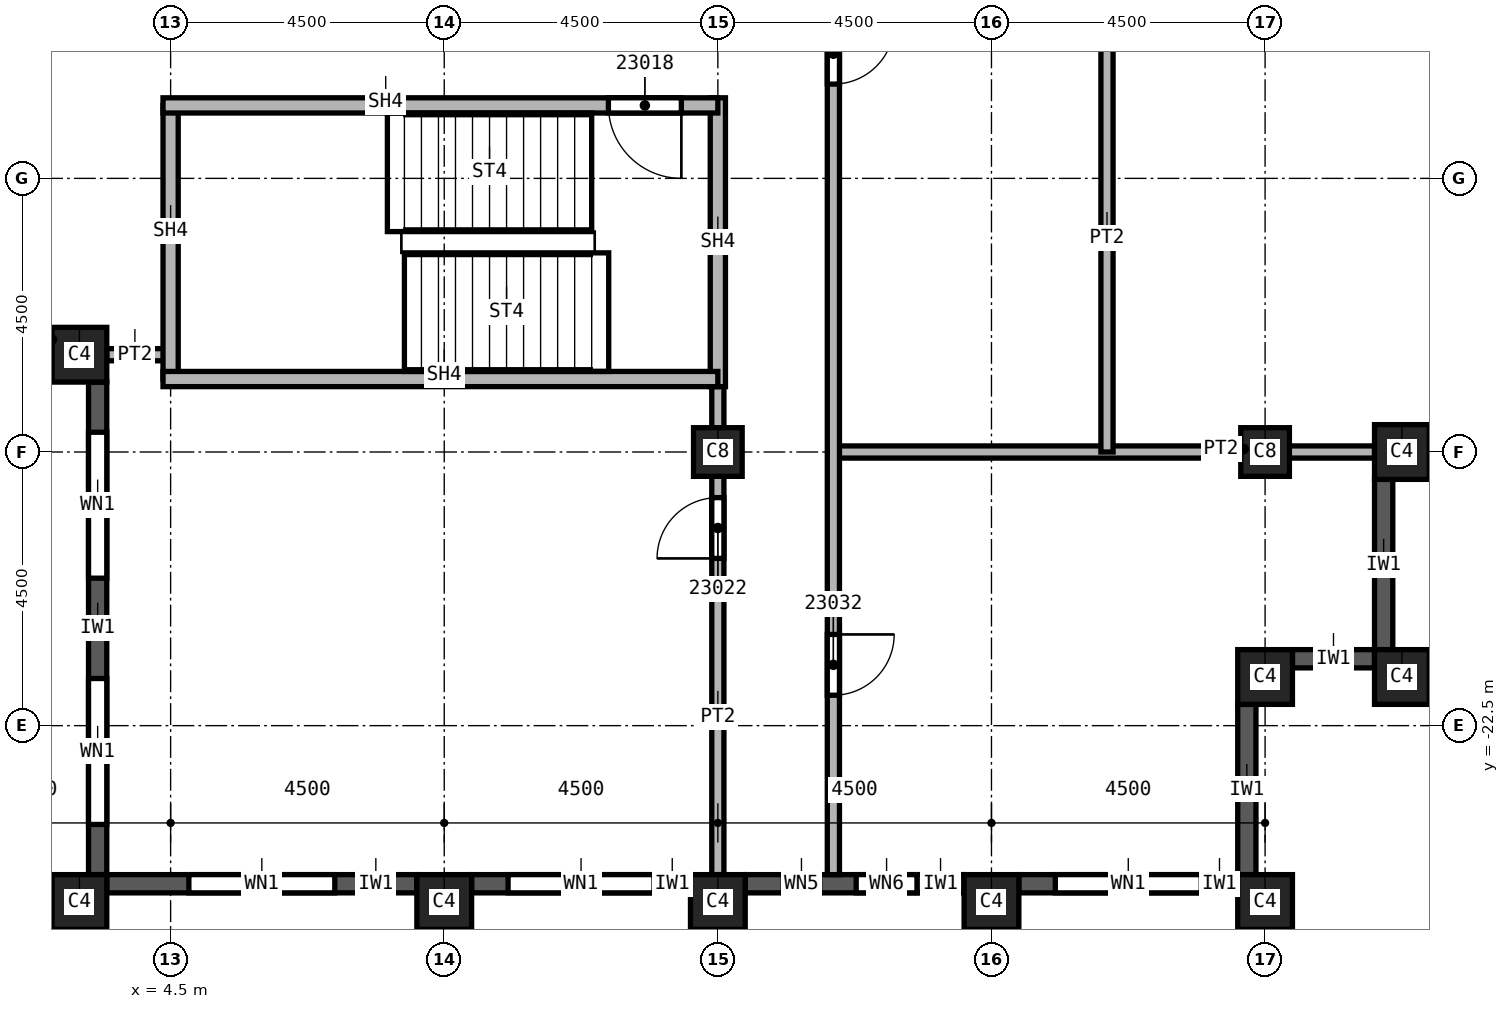
"""IFC4 building model, lengths in metres.
Left out: names, types, materials, properties, quantities, classifications, styles, units other than length and angle.
Written with IfcOpenShell. Run it as: python <this file> out.ifc"""

import sys

from ifc_helpers import new_model, si_unit, direction, frame, frame_2d, origin, origin_2d, place, context, subcontext, project, spatial, rectangle, extrude, element, fill, save


model = new_model("IFC4")
c1 = context("Model", 3, precision=1e-05, world=origin(), true_north=direction((0.0, 1.0)))
c2 = subcontext(c1, "Body", "Model", "MODEL_VIEW")
j1 = project(units=[si_unit("LENGTHUNIT", "METRE"), si_unit("PLANEANGLEUNIT", "RADIAN")], contexts=[c1])
p1 = place(None, origin())
s1 = spatial("IfcSite", under=j1, at=p1, CompositionType="ELEMENT")
p2 = place(p1, origin())
s2 = spatial("IfcBuilding", under=s1, at=p2, CompositionType="ELEMENT")
p3 = place(p2, frame((0.0, 0.0, 330.0)))
s3 = spatial("IfcBuildingStorey", under=s2, at=p3, CompositionType="ELEMENT", Elevation=330.0)
for number, where, z_axis, x_axis in (
    (1, (13.5, -18.0, 0.0), (0.0, 0.0, 1.0), (1.0, 0.0, 0.0)),
    (2, (22.5, -18.0, 0.0), (0.0, 0.0, 1.0), (1.0, 0.0, 0.0)),
):
    element("IfcColumn", number, at=place(p3, frame(where, z_axis=z_axis, x_axis=x_axis)), inside=s3, PredefinedType="COLUMN", context=c2, shape_type="SweptSolid", body=[
        extrude(rectangle(XDim=0.8, YDim=0.8, at=origin_2d()), origin(), (0.0, 0.0, 1.0), 3.74),
    ])
for number, where, z_axis, x_axis in (
    (3, (3.0, -25.4, 0.0), (0.0, 0.0, 1.0), (1.0, 0.0, 0.0)),
    (4, (9.0, -25.4, 0.0), (0.0, 0.0, 1.0), (1.0, 0.0, 0.0)),
    (5, (13.5, -25.4, 0.0), (0.0, 0.0, 1.0), (1.0, 0.0, 0.0)),
    (6, (18.0, -25.4, 0.0), (0.0, 0.0, 1.0), (1.0, 0.0, 0.0)),
    (7, (22.5, -25.4, 0.0), (0.0, 0.0, 1.0), (1.0, 0.0, 0.0)),
    (8, (3.0, -16.4, 0.0), (0.0, 0.0, 1.0), (1.0, 0.0, 0.0)),
    (9, (22.5, -21.7, 0.0), (0.0, 0.0, 1.0), (1.0, 0.0, 0.0)),
    (10, (24.75, -21.7, 0.0), (0.0, 0.0, 1.0), (1.0, 0.0, 0.0)),
    (11, (24.75, -18.0, 0.0), (0.0, 0.0, 1.0), (1.0, 0.0, 0.0)),
):
    element("IfcColumn", number, at=place(p3, frame(where, z_axis=z_axis, x_axis=x_axis)), inside=s3, PredefinedType="COLUMN", context=c2, shape_type="SweptSolid", body=[
        extrude(rectangle(XDim=0.9, YDim=0.9, at=origin_2d()), origin(), (0.0, 0.0, 1.0), 3.74),
    ])
p4 = place(p3, frame((3.3, -16.85, 0.0), z_axis=(0.0, 0.0, 1.0), x_axis=(0.0, -1.0, 0.0)))
e12 = element("IfcWall", 12, at=p4, inside=s3, PredefinedType="SOLIDWALL", context=c2, shape_type="SweptSolid", body=[
    extrude(rectangle(XDim=8.1, YDim=0.3, at=frame_2d((4.05, 0.0))), origin(), (0.0, 0.0, 1.0), 3.14),
])
p5 = place(p4, frame((0.825, 0.0, 0.8)))
e13 = element("IfcOpeningElement", 13, at=p5, cuts=e12, PredefinedType="OPENING", context=c2, shape_type="SweptSolid", body=[
    extrude(rectangle(XDim=2.4, YDim=1.95, at=frame_2d((1.2, 0.975))), frame((0.0, 0.15, 0.0), z_axis=(0.0, -1.0, 0.0), x_axis=(1.0, 0.0, 0.0)), (0.0, 0.0, 1.0), 0.3),
])
p6 = place(p4, frame((4.875, 0.0, 0.8)))
e14 = element("IfcOpeningElement", 14, at=p6, cuts=e12, PredefinedType="OPENING", context=c2, shape_type="SweptSolid", body=[
    extrude(rectangle(XDim=2.4, YDim=1.95, at=frame_2d((1.2, 0.975))), frame((0.0, 0.15, 0.0), z_axis=(0.0, -1.0, 0.0), x_axis=(1.0, 0.0, 0.0)), (0.0, 0.0, 1.0), 0.3),
])
p7 = place(p3, frame((3.45, -25.1, 0.0), z_axis=(0.0, 0.0, 1.0), x_axis=(1.0, 0.0, 0.0)))
e15 = element("IfcWall", 15, at=p7, inside=s3, PredefinedType="SOLIDWALL", context=c2, shape_type="SweptSolid", body=[
    extrude(rectangle(XDim=5.1, YDim=0.3, at=frame_2d((2.55, 0.0))), origin(), (0.0, 0.0, 1.0), 3.14),
])
p8 = place(p7, frame((1.35, 0.0, 0.8)))
e16 = element("IfcOpeningElement", 16, at=p8, cuts=e15, PredefinedType="OPENING", context=c2, shape_type="SweptSolid", body=[
    extrude(rectangle(XDim=2.4, YDim=1.95, at=frame_2d((1.2, 0.975))), frame((0.0, 0.15, 0.0), z_axis=(0.0, -1.0, 0.0), x_axis=(1.0, 0.0, 0.0)), (0.0, 0.0, 1.0), 0.3),
])
p9 = place(p3, frame((9.45, -25.1, 0.0), z_axis=(0.0, 0.0, 1.0), x_axis=(1.0, 0.0, 0.0)))
e17 = element("IfcWall", 17, at=p9, inside=s3, PredefinedType="SOLIDWALL", context=c2, shape_type="SweptSolid", body=[
    extrude(rectangle(XDim=3.6, YDim=0.3, at=frame_2d((1.8, 0.0))), origin(), (0.0, 0.0, 1.0), 3.14),
])
p10 = place(p9, frame((0.6, 0.0, 0.8)))
e18 = element("IfcOpeningElement", 18, at=p10, cuts=e17, PredefinedType="OPENING", context=c2, shape_type="SweptSolid", body=[
    extrude(rectangle(XDim=2.4, YDim=1.95, at=frame_2d((1.2, 0.975))), frame((0.0, 0.15, 0.0), z_axis=(0.0, -1.0, 0.0), x_axis=(1.0, 0.0, 0.0)), (0.0, 0.0, 1.0), 0.3),
])
p11 = place(p3, frame((13.95, -25.1, 0.0), z_axis=(0.0, 0.0, 1.0), x_axis=(1.0, 0.0, 0.0)))
e19 = element("IfcWall", 19, at=p11, inside=s3, PredefinedType="SOLIDWALL", context=c2, shape_type="SweptSolid", body=[
    extrude(rectangle(XDim=3.6, YDim=0.3, at=frame_2d((1.8, 0.0))), origin(), (0.0, 0.0, 1.0), 3.14),
])
p12 = place(p11, frame((0.625, 0.0, 0.8)))
e20 = element("IfcOpeningElement", 20, at=p12, cuts=e19, PredefinedType="OPENING", context=c2, shape_type="SweptSolid", body=[
    extrude(rectangle(XDim=0.6, YDim=1.95, at=frame_2d((0.3, 0.975))), frame((0.0, 0.15, 0.0), z_axis=(0.0, -1.0, 0.0), x_axis=(1.0, 0.0, 0.0)), (0.0, 0.0, 1.0), 0.3),
])
p13 = place(p11, frame((1.825, 0.0, 0.8)))
e21 = element("IfcOpeningElement", 21, at=p13, cuts=e19, PredefinedType="OPENING", context=c2, shape_type="SweptSolid", body=[
    extrude(rectangle(XDim=1.0, YDim=1.95, at=frame_2d((0.5, 0.975))), frame((0.0, 0.15, 0.0), z_axis=(0.0, -1.0, 0.0), x_axis=(1.0, 0.0, 0.0)), (0.0, 0.0, 1.0), 0.3),
])
p14 = place(p3, frame((18.45, -25.1, 0.0), z_axis=(0.0, 0.0, 1.0), x_axis=(1.0, 0.0, 0.0)))
e22 = element("IfcWall", 22, at=p14, inside=s3, PredefinedType="SOLIDWALL", context=c2, shape_type="SweptSolid", body=[
    extrude(rectangle(XDim=3.6, YDim=0.3, at=frame_2d((1.8, 0.0))), origin(), (0.0, 0.0, 1.0), 3.14),
])
p15 = place(p14, frame((0.6, 0.0, 0.8)))
e23 = element("IfcOpeningElement", 23, at=p15, cuts=e22, PredefinedType="OPENING", context=c2, shape_type="SweptSolid", body=[
    extrude(rectangle(XDim=2.4, YDim=1.95, at=frame_2d((1.2, 0.975))), frame((0.0, 0.15, 0.0), z_axis=(0.0, -1.0, 0.0), x_axis=(1.0, 0.0, 0.0)), (0.0, 0.0, 1.0), 0.3),
])
p16 = place(p3, frame((22.2, -24.95, 0.0), z_axis=(0.0, 0.0, 1.0), x_axis=(0.0, 1.0, 0.0)))
e24 = element("IfcWall", 24, at=p16, inside=s3, PredefinedType="SOLIDWALL", context=c2, shape_type="SweptSolid", body=[
    extrude(rectangle(XDim=2.8, YDim=0.3, at=frame_2d((1.4, 0.0))), origin(), (0.0, 0.0, 1.0), 3.14),
])
p17 = place(p3, frame((22.95, -21.4, 0.0), z_axis=(0.0, 0.0, 1.0), x_axis=(1.0, 0.0, 0.0)))
e25 = element("IfcWall", 25, at=p17, inside=s3, PredefinedType="SOLIDWALL", context=c2, shape_type="SweptSolid", body=[
    extrude(rectangle(XDim=1.35, YDim=0.3, at=frame_2d((0.675, 0.0))), origin(), (0.0, 0.0, 1.0), 3.14),
])
p18 = place(p3, frame((24.45, -21.25, 0.0), z_axis=(0.0, 0.0, 1.0), x_axis=(0.0, 1.0, 0.0)))
e26 = element("IfcWall", 26, at=p18, inside=s3, PredefinedType="SOLIDWALL", context=c2, shape_type="SweptSolid", body=[
    extrude(rectangle(XDim=2.8, YDim=0.3, at=frame_2d((1.4, 0.0))), origin(), (0.0, 0.0, 1.0), 3.14),
])
p19 = place(p3, frame((4.5, -16.4, 0.0), z_axis=(0.0, 0.0, 1.0), x_axis=(-1.0, 0.0, 0.0)))
e27 = element("IfcWall", 27, at=p19, inside=s3, PredefinedType="PARTITIONING", context=c2, shape_type="SweptSolid", body=[
    extrude(rectangle(XDim=1.05, YDim=0.2, at=frame_2d((0.525, 0.0))), origin(), (0.0, 0.0, 1.0), 3.74),
])
p20 = place(p3, frame((13.5, -24.95, 0.0), z_axis=(0.0, 0.0, 1.0), x_axis=(0.0, 1.0, 0.0)))
e28 = element("IfcWall", 28, at=p20, inside=s3, PredefinedType="PARTITIONING", context=c2, shape_type="SweptSolid", body=[
    extrude(rectangle(XDim=8.275, YDim=0.2, at=frame_2d((4.137, 0.0))), origin(), (0.0, 0.0, 1.0), 3.74),
])
p21 = place(p20, frame((5.2, 0.0, 0.0)))
e29 = element("IfcOpeningElement", 29, at=p21, cuts=e28, PredefinedType="OPENING", context=c2, shape_type="SweptSolid", body=[
    extrude(rectangle(XDim=1.0, YDim=2.1, at=frame_2d((0.5, 1.05))), frame((0.0, 0.1, 0.0), z_axis=(0.0, -1.0, 0.0), x_axis=(1.0, 0.0, 0.0)), (0.0, 0.0, 1.0), 0.2),
])
p22 = place(p3, frame((15.4, -18.0, 0.0), z_axis=(0.0, 0.0, 1.0), x_axis=(1.0, 0.0, 0.0)))
e30 = element("IfcWall", 30, at=p22, inside=s3, PredefinedType="PARTITIONING", context=c2, shape_type="SweptSolid", body=[
    extrude(rectangle(XDim=8.9, YDim=0.2, at=frame_2d((4.45, 0.0))), origin(), (0.0, 0.0, 1.0), 3.74),
])
p23 = place(p3, frame((15.4, 24.95, 0.0), z_axis=(0.0, 0.0, 1.0), x_axis=(0.0, -1.0, 0.0)))
e31 = element("IfcWall", 31, at=p23, inside=s3, PredefinedType="PARTITIONING", context=c2, shape_type="SweptSolid", body=[
    extrude(rectangle(XDim=49.9, YDim=0.2, at=frame_2d((24.95, 0.0))), origin(), (0.0, 0.0, 1.0), 3.74),
])
p24 = place(p23, frame((20.45, 0.0, 0.0)))
e32 = element("IfcOpeningElement", 32, at=p24, cuts=e31, PredefinedType="OPENING", context=c2, shape_type="SweptSolid", body=[
    extrude(rectangle(XDim=1.0, YDim=2.1, at=frame_2d((0.5, 1.05))), frame((0.0, 0.1, 0.0), z_axis=(0.0, -1.0, 0.0), x_axis=(1.0, 0.0, 0.0)), (0.0, 0.0, 1.0), 0.2),
])
p25 = place(p23, frame((5.05, 0.0, 0.0)))
e33 = element("IfcOpeningElement", 33, at=p25, cuts=e31, PredefinedType="OPENING", context=c2, shape_type="SweptSolid", body=[
    extrude(rectangle(XDim=1.0, YDim=2.1, at=frame_2d((0.5, 1.05))), frame((0.0, 0.1, 0.0), z_axis=(0.0, -1.0, 0.0), x_axis=(1.0, 0.0, 0.0)), (0.0, 0.0, 1.0), 0.2),
])
p26 = place(p23, frame((45.95, 0.0, 0.0)))
e34 = element("IfcOpeningElement", 34, at=p26, cuts=e31, PredefinedType="OPENING", context=c2, shape_type="SweptSolid", body=[
    extrude(rectangle(XDim=1.0, YDim=2.1, at=frame_2d((0.5, 1.05))), frame((0.0, 0.1, 0.0), z_axis=(0.0, -1.0, 0.0), x_axis=(1.0, 0.0, 0.0)), (0.0, 0.0, 1.0), 0.2),
])
p27 = place(p23, frame((35.9, 0.0, 0.0)))
e35 = element("IfcOpeningElement", 35, at=p27, cuts=e31, PredefinedType="OPENING", context=c2, shape_type="SweptSolid", body=[
    extrude(rectangle(XDim=1.0, YDim=2.1, at=frame_2d((0.5, 1.05))), frame((0.0, 0.1, 0.0), z_axis=(0.0, -1.0, 0.0), x_axis=(1.0, 0.0, 0.0)), (0.0, 0.0, 1.0), 0.2),
])
p28 = place(p23, frame((25.1, 0.0, 0.0)))
e36 = element("IfcOpeningElement", 36, at=p28, cuts=e31, PredefinedType="OPENING", context=c2, shape_type="SweptSolid", body=[
    extrude(rectangle(XDim=1.0, YDim=2.1, at=frame_2d((0.5, 1.05))), frame((0.0, 0.1, 0.0), z_axis=(0.0, -1.0, 0.0), x_axis=(1.0, 0.0, 0.0)), (0.0, 0.0, 1.0), 0.2),
])
p29 = place(p3, frame((19.9, -6.65, 0.0), z_axis=(0.0, 0.0, 1.0), x_axis=(0.0, -1.0, 0.0)))
e37 = element("IfcWall", 37, at=p29, inside=s3, PredefinedType="PARTITIONING", context=c2, shape_type="SweptSolid", body=[
    extrude(rectangle(XDim=11.35, YDim=0.2, at=frame_2d((5.675, 0.0))), origin(), (0.0, 0.0, 1.0), 3.74),
])
p30 = place(p29, frame((3.4, 0.0, 0.0)))
e38 = element("IfcOpeningElement", 38, at=p30, cuts=e37, PredefinedType="OPENING", context=c2, shape_type="SweptSolid", body=[
    extrude(rectangle(XDim=1.0, YDim=2.1, at=frame_2d((0.5, 1.05))), frame((0.0, 0.1, 0.0), z_axis=(0.0, -1.0, 0.0), x_axis=(1.0, 0.0, 0.0)), (0.0, 0.0, 1.0), 0.2),
])
p31 = place(p3, frame((4.5, -16.8, 0.0), z_axis=(0.0, 0.0, 1.0), x_axis=(0.0, 1.0, 0.0)))
e39 = element("IfcWall", 39, at=p31, inside=s3, PredefinedType="SOLIDWALL", context=c2, shape_type="SweptSolid", body=[
    extrude(rectangle(XDim=4.5, YDim=0.25, at=frame_2d((2.25, 0.0))), origin(), (0.0, 0.0, 1.0), 3.74),
])
p32 = place(p3, frame((13.5, -16.925, 0.0), z_axis=(0.0, 0.0, 1.0), x_axis=(0.0, 1.0, 0.0)))
e40 = element("IfcWall", 40, at=p32, inside=s3, PredefinedType="SOLIDWALL", context=c2, shape_type="SweptSolid", body=[
    extrude(rectangle(XDim=4.75, YDim=0.25, at=frame_2d((2.375, 0.0))), origin(), (0.0, 0.0, 1.0), 3.74),
])
p33 = place(p3, frame((13.5, -16.8, 0.0), z_axis=(0.0, 0.0, 1.0), x_axis=(-1.0, 0.0, 0.0)))
e41 = element("IfcWall", 41, at=p33, inside=s3, PredefinedType="SOLIDWALL", context=c2, shape_type="SweptSolid", body=[
    extrude(rectangle(XDim=9.125, YDim=0.25, at=frame_2d((4.562, 0.0))), origin(), (0.0, 0.0, 1.0), 3.74),
])
p34 = place(p3, frame((13.5, -12.3, 0.0), z_axis=(0.0, 0.0, 1.0), x_axis=(-1.0, 0.0, 0.0)))
e42 = element("IfcWall", 42, at=p34, inside=s3, PredefinedType="SOLIDWALL", context=c2, shape_type="SweptSolid", body=[
    extrude(rectangle(XDim=9.125, YDim=0.25, at=frame_2d((4.562, 0.0))), origin(), (0.0, 0.0, 1.0), 3.74),
])
p35 = place(p34, frame((0.6, 0.0, 0.0)))
e43 = element("IfcOpeningElement", 43, at=p35, cuts=e42, PredefinedType="OPENING", context=c2, shape_type="SweptSolid", body=[
    extrude(rectangle(XDim=1.2, YDim=2.1, at=frame_2d((0.6, 1.05))), frame((0.0, 0.125, 0.0), z_axis=(0.0, -1.0, 0.0), x_axis=(1.0, 0.0, 0.0)), (0.0, 0.0, 1.0), 0.25),
])
p36 = place(p5, origin())
e44 = element("IfcWindow", 44, at=p36, inside=s3, PartitioningType="SINGLE_PANEL", PredefinedType="WINDOW", context=c2, shape_type="SweptSolid", body=[
    extrude(rectangle(XDim=2.4, YDim=1.95, at=frame_2d((1.2, 0.975))), frame((0.0, 0.03, 0.0), z_axis=(0.0, -1.0, 0.0), x_axis=(1.0, 0.0, 0.0)), (0.0, 0.0, 1.0), 0.06),
])
fill(e13, e44)
p37 = place(p6, origin())
e45 = element("IfcWindow", 45, at=p37, inside=s3, PartitioningType="SINGLE_PANEL", PredefinedType="WINDOW", context=c2, shape_type="SweptSolid", body=[
    extrude(rectangle(XDim=2.4, YDim=1.95, at=frame_2d((1.2, 0.975))), frame((0.0, 0.03, 0.0), z_axis=(0.0, -1.0, 0.0), x_axis=(1.0, 0.0, 0.0)), (0.0, 0.0, 1.0), 0.06),
])
fill(e14, e45)
p38 = place(p8, origin())
e46 = element("IfcWindow", 46, at=p38, inside=s3, PartitioningType="SINGLE_PANEL", PredefinedType="WINDOW", context=c2, shape_type="SweptSolid", body=[
    extrude(rectangle(XDim=2.4, YDim=1.95, at=frame_2d((1.2, 0.975))), frame((0.0, 0.03, 0.0), z_axis=(0.0, -1.0, 0.0), x_axis=(1.0, 0.0, 0.0)), (0.0, 0.0, 1.0), 0.06),
])
fill(e16, e46)
p39 = place(p10, origin())
e47 = element("IfcWindow", 47, at=p39, inside=s3, PartitioningType="SINGLE_PANEL", PredefinedType="WINDOW", context=c2, shape_type="SweptSolid", body=[
    extrude(rectangle(XDim=2.4, YDim=1.95, at=frame_2d((1.2, 0.975))), frame((0.0, 0.03, 0.0), z_axis=(0.0, -1.0, 0.0), x_axis=(1.0, 0.0, 0.0)), (0.0, 0.0, 1.0), 0.06),
])
fill(e18, e47)
p40 = place(p15, origin())
e48 = element("IfcWindow", 48, at=p40, inside=s3, PartitioningType="SINGLE_PANEL", PredefinedType="WINDOW", context=c2, shape_type="SweptSolid", body=[
    extrude(rectangle(XDim=2.4, YDim=1.95, at=frame_2d((1.2, 0.975))), frame((0.0, 0.03, 0.0), z_axis=(0.0, -1.0, 0.0), x_axis=(1.0, 0.0, 0.0)), (0.0, 0.0, 1.0), 0.06),
])
fill(e23, e48)
p41 = place(p35, origin())
e49 = element("IfcDoor", 49, at=p41, inside=s3, OperationType="SINGLE_SWING_LEFT", PredefinedType="DOOR", context=c2, shape_type="SweptSolid", body=[
    extrude(rectangle(XDim=1.2, YDim=2.1, at=frame_2d((0.6, 1.05))), frame((0.0, 0.025, 0.0), z_axis=(0.0, -1.0, 0.0), x_axis=(1.0, 0.0, 0.0)), (0.0, 0.0, 1.0), 0.05),
])
fill(e43, e49)
p42 = place(p21, origin())
e50 = element("IfcDoor", 50, at=p42, inside=s3, OperationType="SINGLE_SWING_LEFT", PredefinedType="DOOR", context=c2, shape_type="SweptSolid", body=[
    extrude(rectangle(XDim=1.0, YDim=2.1, at=frame_2d((0.5, 1.05))), frame((0.0, 0.025, 0.0), z_axis=(0.0, -1.0, 0.0), x_axis=(1.0, 0.0, 0.0)), (0.0, 0.0, 1.0), 0.05),
])
fill(e29, e50)
p43 = place(p26, origin())
e51 = element("IfcDoor", 51, at=p43, inside=s3, OperationType="SINGLE_SWING_LEFT", PredefinedType="DOOR", context=c2, shape_type="SweptSolid", body=[
    extrude(rectangle(XDim=1.0, YDim=2.1, at=frame_2d((0.5, 1.05))), frame((0.0, 0.025, 0.0), z_axis=(0.0, -1.0, 0.0), x_axis=(1.0, 0.0, 0.0)), (0.0, 0.0, 1.0), 0.05),
])
fill(e34, e51)
p44 = place(p27, origin())
e52 = element("IfcDoor", 52, at=p44, inside=s3, OperationType="SINGLE_SWING_RIGHT", PredefinedType="DOOR", context=c2, shape_type="SweptSolid", body=[
    extrude(rectangle(XDim=1.0, YDim=2.1, at=frame_2d((0.5, 1.05))), frame((0.0, 0.025, 0.0), z_axis=(0.0, -1.0, 0.0), x_axis=(1.0, 0.0, 0.0)), (0.0, 0.0, 1.0), 0.05),
])
fill(e35, e52)
p45 = place(p12, origin())
e53 = element("IfcWindow", 53, at=p45, inside=s3, PartitioningType="SINGLE_PANEL", PredefinedType="WINDOW", context=c2, shape_type="SweptSolid", body=[
    extrude(rectangle(XDim=0.6, YDim=1.95, at=frame_2d((0.3, 0.975))), frame((0.0, 0.03, 0.0), z_axis=(0.0, -1.0, 0.0), x_axis=(1.0, 0.0, 0.0)), (0.0, 0.0, 1.0), 0.06),
])
fill(e20, e53)
p46 = place(p13, origin())
e54 = element("IfcWindow", 54, at=p46, inside=s3, PartitioningType="SINGLE_PANEL", PredefinedType="WINDOW", context=c2, shape_type="SweptSolid", body=[
    extrude(rectangle(XDim=1.0, YDim=1.95, at=frame_2d((0.5, 0.975))), frame((0.0, 0.03, 0.0), z_axis=(0.0, -1.0, 0.0), x_axis=(1.0, 0.0, 0.0)), (0.0, 0.0, 1.0), 0.06),
])
fill(e21, e54)
save(model, sys.argv[1])
